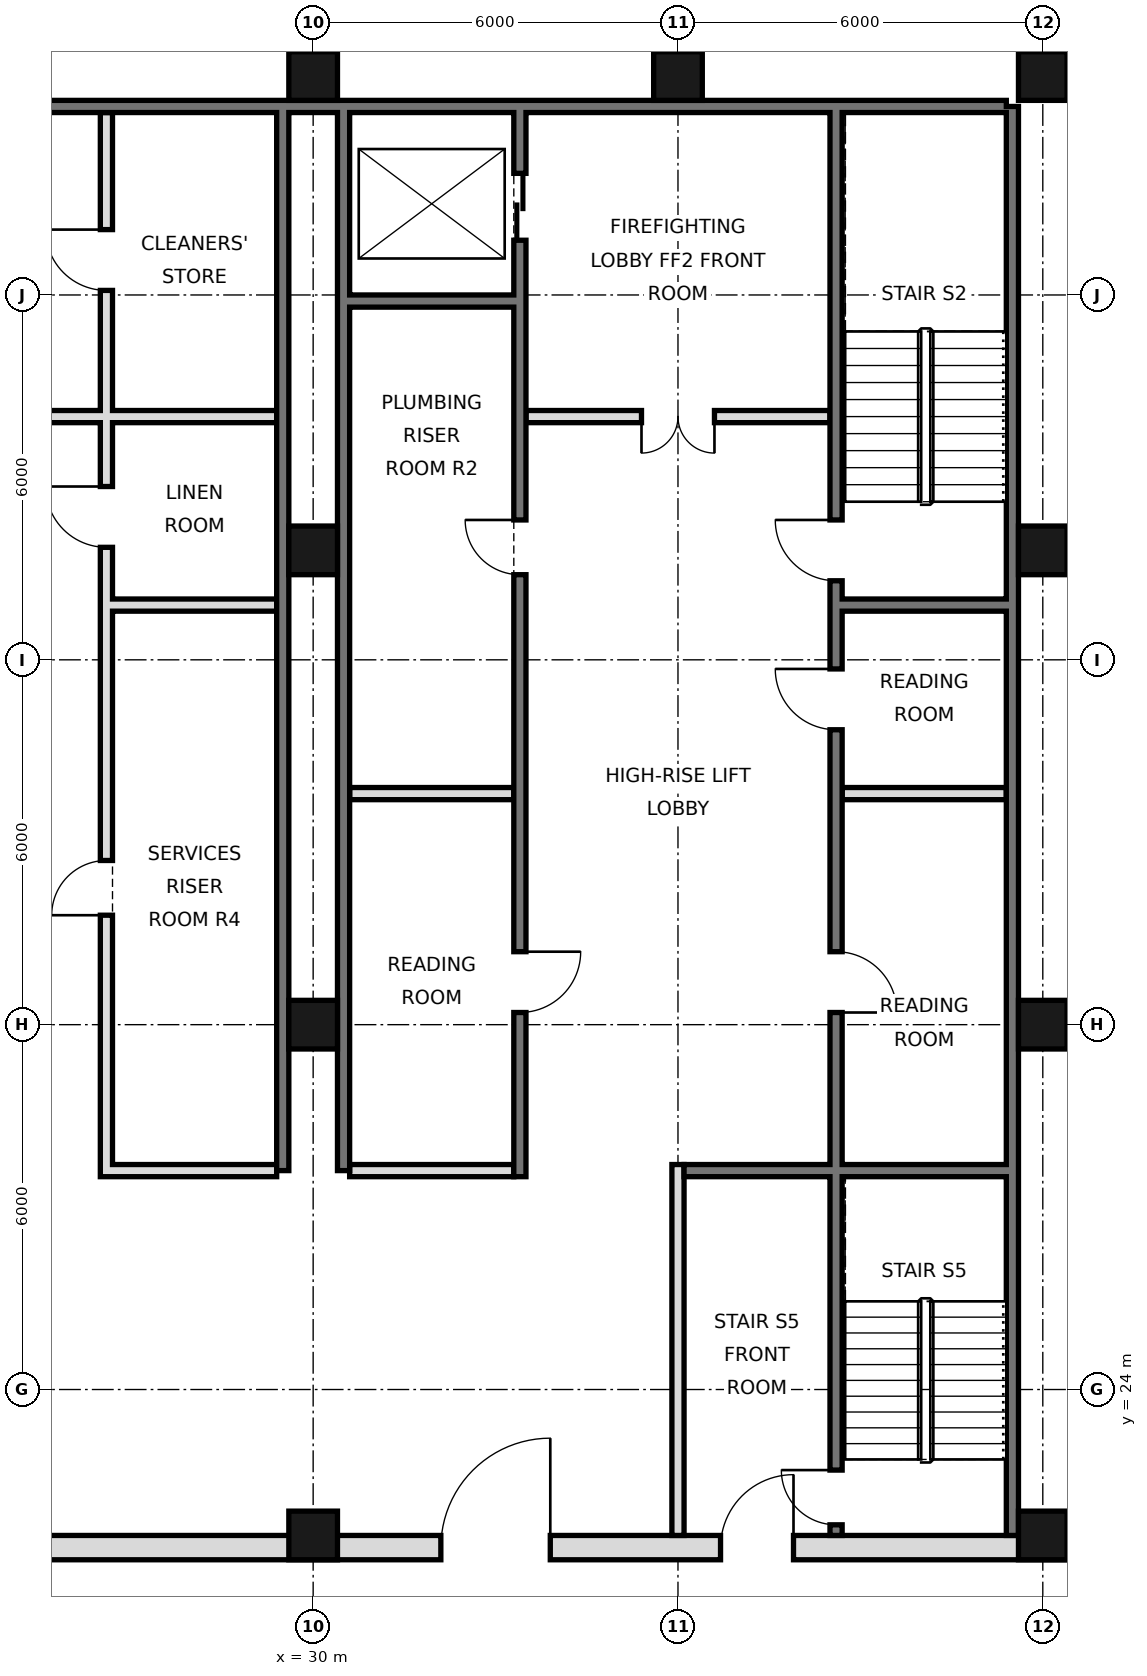
"""IFC4 building model, lengths in metres.
Left out: names, types, materials, properties, quantities, classifications, styles, units other than length and angle.
Written with IfcOpenShell. Run it as: python <this file> out.ifc"""

import sys

from ifc_helpers import new_model, si_unit, direction, frame, frame_2d, origin, origin_2d, place, context, subcontext, project, spatial, rectangle, hollow_rectangle, extrude, element, fill, save


model = new_model("IFC4")
c1 = context("Model", 3, precision=1e-05, world=origin(), true_north=direction((0.0, 1.0)))
c2 = subcontext(c1, "Body", "Model", "MODEL_VIEW")
j1 = project(units=[si_unit("LENGTHUNIT", "METRE"), si_unit("PLANEANGLEUNIT", "RADIAN")], contexts=[c1])
p1 = place(None, origin())
s1 = spatial("IfcSite", under=j1, at=p1, CompositionType="ELEMENT")
p2 = place(p1, origin())
s2 = spatial("IfcBuilding", under=s1, at=p2, CompositionType="ELEMENT")
p3 = place(p2, frame((0.0, 0.0, 147.4)))
s3 = spatial("IfcBuildingStorey", under=s2, at=p3, CompositionType="ELEMENT", Elevation=147.4)
for number, where, z_axis, x_axis in (
    (1, (30.0, 21.6, 0.0), (0.0, 0.0, 1.0), (1.0, 0.0, 0.0)),
    (2, (30.0, 30.0, 0.0), (0.0, 0.0, 1.0), (1.0, 0.0, 0.0)),
    (3, (30.0, 37.8, 0.0), (0.0, 0.0, 1.0), (1.0, 0.0, 0.0)),
    (4, (30.0, 45.6, 0.0), (0.0, 0.0, 1.0), (1.0, 0.0, 0.0)),
    (5, (36.0, 45.6, 0.0), (0.0, 0.0, 1.0), (1.0, 0.0, 0.0)),
    (6, (42.0, 21.6, 0.0), (0.0, 0.0, 1.0), (1.0, 0.0, 0.0)),
    (7, (42.0, 30.0, 0.0), (0.0, 0.0, 1.0), (1.0, 0.0, 0.0)),
    (8, (42.0, 37.8, 0.0), (0.0, 0.0, 1.0), (1.0, 0.0, 0.0)),
    (9, (42.0, 45.6, 0.0), (0.0, 0.0, 1.0), (1.0, 0.0, 0.0)),
):
    element("IfcColumn", number, at=place(p3, frame(where, z_axis=z_axis, x_axis=x_axis)), inside=s3, PredefinedType="COLUMN", context=c2, shape_type="SweptSolid", body=[
        extrude(hollow_rectangle(XDim=0.8, YDim=0.8, WallThickness=0.045, at=origin_2d()), origin(), (0.0, 0.0, 1.0), 3.6),
    ])
p4 = place(p3, frame((41.5, 21.6, 0.0), z_axis=(0.0, 0.0, 1.0), x_axis=(0.0, 1.0, 0.0)))
e10 = element("IfcWall", 10, at=p4, inside=s3, PredefinedType="SOLIDWALL", context=c2, shape_type="SweptSolid", body=[
    extrude(rectangle(XDim=23.5, YDim=0.2, at=frame_2d((11.75, 0.0))), origin(), (0.0, 0.0, 1.0), 3.42),
])
p5 = place(p3, frame((6.6, 45.1, 0.0), z_axis=(0.0, 0.0, 1.0), x_axis=(1.0, 0.0, 0.0)))
e11 = element("IfcWall", 11, at=p5, inside=s3, PredefinedType="SOLIDWALL", context=c2, shape_type="SweptSolid", body=[
    extrude(rectangle(XDim=34.8, YDim=0.2, at=frame_2d((17.4, 0.0))), origin(), (0.0, 0.0, 1.0), 3.42),
])
for number, where, z_axis, x_axis in (
    (12, (29.5, 27.6, 0.0), (0.0, 0.0, 1.0), (0.0, 1.0, 0.0)),
    (13, (30.5, 27.6, 0.0), (0.0, 0.0, 1.0), (0.0, 1.0, 0.0)),
):
    element("IfcWall", number, at=place(p3, frame(where, z_axis=z_axis, x_axis=x_axis)), inside=s3, PredefinedType="SOLIDWALL", context=c2, shape_type="SweptSolid", body=[
        extrude(rectangle(XDim=17.5, YDim=0.2, at=frame_2d((8.75, 0.0))), origin(), (0.0, 0.0, 1.0), 3.42),
    ])
p6 = place(p3, frame((5.6, 21.4, 0.0), z_axis=(0.0, 0.0, 1.0), x_axis=(1.0, 0.0, 0.0)))
e14 = element("IfcWall", 14, at=p6, inside=s3, PredefinedType="SOLIDWALL", context=c2, shape_type="SweptSolid", body=[
    extrude(rectangle(XDim=36.8, YDim=0.4, at=frame_2d((18.4, 0.0))), origin(), (0.0, 0.0, 1.0), 3.42),
])
p7 = place(p6, frame((8.5, 0.0, 0.0)))
e15 = element("IfcOpeningElement", 15, at=p7, cuts=e14, PredefinedType="OPENING", context=c2, shape_type="SweptSolid", body=[
    extrude(rectangle(XDim=1.8, YDim=2.1, at=frame_2d((0.9, 1.05))), frame((0.0, 0.21, 0.0), z_axis=(0.0, -1.0, 0.0), x_axis=(1.0, 0.0, 0.0)), (0.0, 0.0, 1.0), 0.42),
])
p8 = place(p6, frame((17.5, 0.0, 0.0)))
e16 = element("IfcOpeningElement", 16, at=p8, cuts=e14, PredefinedType="OPENING", context=c2, shape_type="SweptSolid", body=[
    extrude(rectangle(XDim=1.8, YDim=2.1, at=frame_2d((0.9, 1.05))), frame((0.0, 0.21, 0.0), z_axis=(0.0, -1.0, 0.0), x_axis=(1.0, 0.0, 0.0)), (0.0, 0.0, 1.0), 0.42),
])
p9 = place(p6, frame((26.5, 0.0, 0.0)))
e17 = element("IfcOpeningElement", 17, at=p9, cuts=e14, PredefinedType="OPENING", context=c2, shape_type="SweptSolid", body=[
    extrude(rectangle(XDim=1.8, YDim=2.1, at=frame_2d((0.9, 1.05))), frame((0.0, 0.21, 0.0), z_axis=(0.0, -1.0, 0.0), x_axis=(1.0, 0.0, 0.0)), (0.0, 0.0, 1.0), 0.42),
])
p10 = place(p6, frame((4.5, 0.0, 0.0)))
e18 = element("IfcOpeningElement", 18, at=p10, cuts=e14, PredefinedType="OPENING", context=c2, shape_type="SweptSolid", body=[
    extrude(rectangle(XDim=1.2, YDim=2.1, at=frame_2d((0.6, 1.05))), frame((0.0, 0.21, 0.0), z_axis=(0.0, -1.0, 0.0), x_axis=(1.0, 0.0, 0.0)), (0.0, 0.0, 1.0), 0.42),
])
p11 = place(p6, frame((31.1, 0.0, 0.0)))
e19 = element("IfcOpeningElement", 19, at=p11, cuts=e14, PredefinedType="OPENING", context=c2, shape_type="SweptSolid", body=[
    extrude(rectangle(XDim=1.2, YDim=2.1, at=frame_2d((0.6, 1.05))), frame((0.0, 0.21, 0.0), z_axis=(0.0, -1.0, 0.0), x_axis=(1.0, 0.0, 0.0)), (0.0, 0.0, 1.0), 0.42),
])
p12 = place(p3, frame((26.6, 27.5, 0.0), z_axis=(0.0, 0.0, 1.0), x_axis=(0.0, 1.0, 0.0)))
e20 = element("IfcWall", 20, at=p12, inside=s3, PredefinedType="SOLIDWALL", context=c2, shape_type="SweptSolid", body=[
    extrude(rectangle(XDim=17.5, YDim=0.2, at=frame_2d((8.75, 0.0))), origin(), (0.0, 0.0, 1.0), 3.42),
])
p13 = place(p12, frame((4.3, 0.0, 0.0)))
e21 = element("IfcOpeningElement", 21, at=p13, cuts=e20, PredefinedType="OPENING", context=c2, shape_type="SweptSolid", body=[
    extrude(rectangle(XDim=0.9, YDim=2.1, at=frame_2d((0.45, 1.05))), frame((0.0, 0.11, 0.0), z_axis=(0.0, -1.0, 0.0), x_axis=(1.0, 0.0, 0.0)), (0.0, 0.0, 1.0), 0.22),
])
p14 = place(p12, frame((10.35, 0.0, 0.0)))
e22 = element("IfcOpeningElement", 22, at=p14, cuts=e20, PredefinedType="OPENING", context=c2, shape_type="SweptSolid", body=[
    extrude(rectangle(XDim=1.0, YDim=2.1, at=frame_2d((0.5, 1.05))), frame((0.0, 0.11, 0.0), z_axis=(0.0, -1.0, 0.0), x_axis=(1.0, 0.0, 0.0)), (0.0, 0.0, 1.0), 0.22),
])
p15 = place(p12, frame((14.575, 0.0, 0.0)))
e23 = element("IfcOpeningElement", 23, at=p15, cuts=e20, PredefinedType="OPENING", context=c2, shape_type="SweptSolid", body=[
    extrude(rectangle(XDim=1.0, YDim=2.1, at=frame_2d((0.5, 1.05))), frame((0.0, 0.11, 0.0), z_axis=(0.0, -1.0, 0.0), x_axis=(1.0, 0.0, 0.0)), (0.0, 0.0, 1.0), 0.22),
])
p16 = place(p3, frame((33.4, 27.5, 0.0), z_axis=(0.0, 0.0, 1.0), x_axis=(0.0, 1.0, 0.0)))
e24 = element("IfcWall", 24, at=p16, inside=s3, PredefinedType="SOLIDWALL", context=c2, shape_type="SweptSolid", body=[
    extrude(rectangle(XDim=17.5, YDim=0.2, at=frame_2d((8.75, 0.0))), origin(), (0.0, 0.0, 1.0), 3.42),
])
p17 = place(p16, frame((15.4, 0.0, 0.0)))
e25 = element("IfcOpeningElement", 25, at=p17, cuts=e24, PredefinedType="OPENING", context=c2, shape_type="SweptSolid", body=[
    extrude(rectangle(XDim=1.1, YDim=2.1, at=frame_2d((0.55, 1.05))), frame((0.0, 0.11, 0.0), z_axis=(0.0, -1.0, 0.0), x_axis=(1.0, 0.0, 0.0)), (0.0, 0.0, 1.0), 0.22),
])
p18 = place(p16, frame((2.7, 0.0, 0.0)))
e26 = element("IfcOpeningElement", 26, at=p18, cuts=e24, PredefinedType="OPENING", context=c2, shape_type="SweptSolid", body=[
    extrude(rectangle(XDim=1.0, YDim=2.1, at=frame_2d((0.5, 1.05))), frame((0.0, 0.11, 0.0), z_axis=(0.0, -1.0, 0.0), x_axis=(1.0, 0.0, 0.0)), (0.0, 0.0, 1.0), 0.22),
])
p19 = place(p16, frame((9.9, 0.0, 0.0)))
e27 = element("IfcOpeningElement", 27, at=p19, cuts=e24, PredefinedType="OPENING", context=c2, shape_type="SweptSolid", body=[
    extrude(rectangle(XDim=0.9, YDim=2.1, at=frame_2d((0.45, 1.05))), frame((0.0, 0.11, 0.0), z_axis=(0.0, -1.0, 0.0), x_axis=(1.0, 0.0, 0.0)), (0.0, 0.0, 1.0), 0.22),
])
p20 = place(p3, frame((36.0, 21.6, 0.0), z_axis=(0.0, 0.0, 1.0), x_axis=(0.0, 1.0, 0.0)))
e28 = element("IfcWall", 28, at=p20, inside=s3, PredefinedType="PARTITIONING", context=c2, shape_type="SweptSolid", body=[
    extrude(rectangle(XDim=6.1, YDim=0.2, at=frame_2d((3.05, 0.0))), origin(), (0.0, 0.0, 1.0), 3.42),
])
p21 = place(p3, frame((38.6, 21.6, 0.0), z_axis=(0.0, 0.0, 1.0), x_axis=(0.0, 1.0, 0.0)))
e29 = element("IfcWall", 29, at=p21, inside=s3, PredefinedType="SOLIDWALL", context=c2, shape_type="SweptSolid", body=[
    extrude(rectangle(XDim=23.4, YDim=0.2, at=frame_2d((11.7, 0.0))), origin(), (0.0, 0.0, 1.0), 3.42),
])
p22 = place(p21, frame((8.6, 0.0, 0.0)))
e30 = element("IfcOpeningElement", 30, at=p22, cuts=e29, PredefinedType="OPENING", context=c2, shape_type="SweptSolid", body=[
    extrude(rectangle(XDim=1.0, YDim=2.1, at=frame_2d((0.5, 1.05))), frame((0.0, 0.11, 0.0), z_axis=(0.0, -1.0, 0.0), x_axis=(1.0, 0.0, 0.0)), (0.0, 0.0, 1.0), 0.22),
])
p23 = place(p21, frame((13.25, 0.0, 0.0)))
e31 = element("IfcOpeningElement", 31, at=p23, cuts=e29, PredefinedType="OPENING", context=c2, shape_type="SweptSolid", body=[
    extrude(rectangle(XDim=1.0, YDim=2.1, at=frame_2d((0.5, 1.05))), frame((0.0, 0.11, 0.0), z_axis=(0.0, -1.0, 0.0), x_axis=(1.0, 0.0, 0.0)), (0.0, 0.0, 1.0), 0.22),
])
p24 = place(p21, frame((15.7, 0.0, 0.0)))
e32 = element("IfcOpeningElement", 32, at=p24, cuts=e29, PredefinedType="OPENING", context=c2, shape_type="SweptSolid", body=[
    extrude(rectangle(XDim=1.0, YDim=2.1, at=frame_2d((0.5, 1.05))), frame((0.0, 0.11, 0.0), z_axis=(0.0, -1.0, 0.0), x_axis=(1.0, 0.0, 0.0)), (0.0, 0.0, 1.0), 0.22),
])
p25 = place(p21, frame((0.175, 0.0, 0.0)))
e33 = element("IfcOpeningElement", 33, at=p25, cuts=e29, PredefinedType="OPENING", context=c2, shape_type="SweptSolid", body=[
    extrude(rectangle(XDim=0.9, YDim=2.1, at=frame_2d((0.45, 1.05))), frame((0.0, 0.11, 0.0), z_axis=(0.0, -1.0, 0.0), x_axis=(1.0, 0.0, 0.0)), (0.0, 0.0, 1.0), 0.22),
])
p26 = place(p3, frame((26.7, 27.6, 0.0), z_axis=(0.0, 0.0, 1.0), x_axis=(1.0, 0.0, 0.0)))
e34 = element("IfcWall", 34, at=p26, inside=s3, PredefinedType="SOLIDWALL", context=c2, shape_type="SweptSolid", body=[
    extrude(rectangle(XDim=2.7, YDim=0.2, at=frame_2d((1.35, 0.0))), origin(), (0.0, 0.0, 1.0), 3.42),
])
p27 = place(p3, frame((30.6, 27.6, 0.0), z_axis=(0.0, 0.0, 1.0), x_axis=(1.0, 0.0, 0.0)))
e35 = element("IfcWall", 35, at=p27, inside=s3, PredefinedType="PARTITIONING", context=c2, shape_type="SweptSolid", body=[
    extrude(rectangle(XDim=2.7, YDim=0.2, at=frame_2d((1.35, 0.0))), origin(), (0.0, 0.0, 1.0), 3.42),
])
p28 = place(p3, frame((36.1, 27.6, 0.0), z_axis=(0.0, 0.0, 1.0), x_axis=(1.0, 0.0, 0.0)))
e36 = element("IfcWall", 36, at=p28, inside=s3, PredefinedType="SOLIDWALL", context=c2, shape_type="SweptSolid", body=[
    extrude(rectangle(XDim=5.3, YDim=0.2, at=frame_2d((2.65, 0.0))), origin(), (0.0, 0.0, 1.0), 3.42),
])
p29 = place(p3, frame((30.6, 33.8, 0.0), z_axis=(0.0, 0.0, 1.0), x_axis=(1.0, 0.0, 0.0)))
e37 = element("IfcWall", 37, at=p29, inside=s3, PredefinedType="SOLIDWALL", context=c2, shape_type="SweptSolid", body=[
    extrude(rectangle(XDim=2.7, YDim=0.2, at=frame_2d((1.35, 0.0))), origin(), (0.0, 0.0, 1.0), 3.42),
])
p30 = place(p3, frame((38.7, 33.8, 0.0), z_axis=(0.0, 0.0, 1.0), x_axis=(1.0, 0.0, 0.0)))
e38 = element("IfcWall", 38, at=p30, inside=s3, PredefinedType="PARTITIONING", context=c2, shape_type="SweptSolid", body=[
    extrude(rectangle(XDim=2.7, YDim=0.2, at=frame_2d((1.35, 0.0))), origin(), (0.0, 0.0, 1.0), 3.42),
])
for number, where, z_axis, x_axis in (
    (39, (26.7, 36.9, 0.0), (0.0, 0.0, 1.0), (1.0, 0.0, 0.0)),
    (40, (38.7, 36.9, 0.0), (0.0, 0.0, 1.0), (1.0, 0.0, 0.0)),
):
    element("IfcWall", number, at=place(p3, frame(where, z_axis=z_axis, x_axis=x_axis)), inside=s3, PredefinedType="SOLIDWALL", context=c2, shape_type="SweptSolid", body=[
        extrude(rectangle(XDim=2.7, YDim=0.2, at=frame_2d((1.35, 0.0))), origin(), (0.0, 0.0, 1.0), 3.42),
    ])
p31 = place(p3, frame((21.5, 40.0, 0.0), z_axis=(0.0, 0.0, 1.0), x_axis=(1.0, 0.0, 0.0)))
e41 = element("IfcWall", 41, at=p31, inside=s3, PredefinedType="PARTITIONING", context=c2, shape_type="SweptSolid", body=[
    extrude(rectangle(XDim=7.9, YDim=0.2, at=frame_2d((3.95, 0.0))), origin(), (0.0, 0.0, 1.0), 3.42),
])
p32 = place(p31, frame((1.9, 0.0, 0.0)))
e42 = element("IfcOpeningElement", 42, at=p32, cuts=e41, PredefinedType="OPENING", context=c2, shape_type="SweptSolid", body=[
    extrude(rectangle(XDim=1.2, YDim=2.1, at=frame_2d((0.6, 1.05))), frame((0.0, 0.11, 0.0), z_axis=(0.0, -1.0, 0.0), x_axis=(1.0, 0.0, 0.0)), (0.0, 0.0, 1.0), 0.22),
])
p33 = place(p3, frame((33.5, 40.0, 0.0), z_axis=(0.0, 0.0, 1.0), x_axis=(1.0, 0.0, 0.0)))
e43 = element("IfcWall", 43, at=p33, inside=s3, PredefinedType="PARTITIONING", context=c2, shape_type="SweptSolid", body=[
    extrude(rectangle(XDim=5.0, YDim=0.2, at=frame_2d((2.5, 0.0))), origin(), (0.0, 0.0, 1.0), 3.42),
])
p34 = place(p33, frame((1.9, 0.0, 0.0)))
e44 = element("IfcOpeningElement", 44, at=p34, cuts=e43, PredefinedType="OPENING", context=c2, shape_type="SweptSolid", body=[
    extrude(rectangle(XDim=1.2, YDim=2.1, at=frame_2d((0.6, 1.05))), frame((0.0, 0.11, 0.0), z_axis=(0.0, -1.0, 0.0), x_axis=(1.0, 0.0, 0.0)), (0.0, 0.0, 1.0), 0.22),
])
p35 = place(p3, frame((30.6, 41.9, 0.0), z_axis=(0.0, 0.0, 1.0), x_axis=(1.0, 0.0, 0.0)))
e45 = element("IfcWall", 45, at=p35, inside=s3, PredefinedType="SOLIDWALL", context=c2, shape_type="SweptSolid", body=[
    extrude(rectangle(XDim=2.7, YDim=0.2, at=frame_2d((1.35, 0.0))), origin(), (0.0, 0.0, 1.0), 3.42),
])
p36 = place(p9, frame((1.8, 0.0, 0.0), z_axis=(0.0, 0.0, 1.0), x_axis=(-1.0, 0.0, 0.0)))
e46 = element("IfcDoor", 46, at=p36, inside=s3, OperationType="SINGLE_SWING_LEFT", PredefinedType="DOOR", context=c2, shape_type="SweptSolid", body=[
    extrude(rectangle(XDim=1.8, YDim=2.1, at=frame_2d((0.9, 1.05))), frame((0.0, 0.025, 0.0), z_axis=(0.0, -1.0, 0.0), x_axis=(1.0, 0.0, 0.0)), (0.0, 0.0, 1.0), 0.05),
])
fill(e17, e46)
p37 = place(p11, frame((1.2, 0.0, 0.0), z_axis=(0.0, 0.0, 1.0), x_axis=(-1.0, 0.0, 0.0)))
e47 = element("IfcDoor", 47, at=p37, inside=s3, OperationType="SINGLE_SWING_LEFT", PredefinedType="DOOR", context=c2, shape_type="SweptSolid", body=[
    extrude(rectangle(XDim=1.2, YDim=2.1, at=frame_2d((0.6, 1.05))), frame((0.0, 0.025, 0.0), z_axis=(0.0, -1.0, 0.0), x_axis=(1.0, 0.0, 0.0)), (0.0, 0.0, 1.0), 0.05),
])
fill(e19, e47)
p38 = place(p34, frame((1.2, 0.0, 0.0), z_axis=(0.0, 0.0, 1.0), x_axis=(-1.0, 0.0, 0.0)))
e48 = element("IfcDoor", 48, at=p38, inside=s3, OperationType="DOUBLE_DOOR_SINGLE_SWING", PredefinedType="DOOR", context=c2, shape_type="SweptSolid", body=[
    extrude(rectangle(XDim=1.2, YDim=2.1, at=frame_2d((0.6, 1.05))), frame((0.0, 0.025, 0.0), z_axis=(0.0, -1.0, 0.0), x_axis=(1.0, 0.0, 0.0)), (0.0, 0.0, 1.0), 0.05),
])
fill(e44, e48)
p39 = place(p17, origin())
e49 = element("IfcDoor", 49, at=p39, inside=s3, OperationType="DOUBLE_DOOR_SLIDING", PredefinedType="DOOR", context=c2, shape_type="SweptSolid", body=[
    extrude(rectangle(XDim=1.1, YDim=2.1, at=frame_2d((0.55, 1.05))), frame((0.0, 0.025, 0.0), z_axis=(0.0, -1.0, 0.0), x_axis=(1.0, 0.0, 0.0)), (0.0, 0.0, 1.0), 0.05),
])
fill(e25, e49)
p40 = place(p22, frame((1.0, 0.0, 0.0), z_axis=(0.0, 0.0, 1.0), x_axis=(-1.0, 0.0, 0.0)))
e50 = element("IfcDoor", 50, at=p40, inside=s3, OperationType="SINGLE_SWING_RIGHT", PredefinedType="DOOR", context=c2, shape_type="SweptSolid", body=[
    extrude(rectangle(XDim=1.0, YDim=2.1, at=frame_2d((0.5, 1.05))), frame((0.0, 0.025, 0.0), z_axis=(0.0, -1.0, 0.0), x_axis=(1.0, 0.0, 0.0)), (0.0, 0.0, 1.0), 0.05),
])
fill(e30, e50)
p41 = place(p23, frame((1.0, 0.0, 0.0), z_axis=(0.0, 0.0, 1.0), x_axis=(-1.0, 0.0, 0.0)))
e51 = element("IfcDoor", 51, at=p41, inside=s3, OperationType="SINGLE_SWING_LEFT", PredefinedType="DOOR", context=c2, shape_type="SweptSolid", body=[
    extrude(rectangle(XDim=1.0, YDim=2.1, at=frame_2d((0.5, 1.05))), frame((0.0, 0.025, 0.0), z_axis=(0.0, -1.0, 0.0), x_axis=(1.0, 0.0, 0.0)), (0.0, 0.0, 1.0), 0.05),
])
fill(e31, e51)
p42 = place(p18, origin())
e52 = element("IfcDoor", 52, at=p42, inside=s3, OperationType="SINGLE_SWING_RIGHT", PredefinedType="DOOR", context=c2, shape_type="SweptSolid", body=[
    extrude(rectangle(XDim=1.0, YDim=2.1, at=frame_2d((0.5, 1.05))), frame((0.0, 0.025, 0.0), z_axis=(0.0, -1.0, 0.0), x_axis=(1.0, 0.0, 0.0)), (0.0, 0.0, 1.0), 0.05),
])
fill(e26, e52)
p43 = place(p24, frame((1.0, 0.0, 0.0), z_axis=(0.0, 0.0, 1.0), x_axis=(-1.0, 0.0, 0.0)))
e53 = element("IfcDoor", 53, at=p43, inside=s3, OperationType="SINGLE_SWING_LEFT", PredefinedType="DOOR", context=c2, shape_type="SweptSolid", body=[
    extrude(rectangle(XDim=1.0, YDim=2.1, at=frame_2d((0.5, 1.05))), frame((0.0, 0.025, 0.0), z_axis=(0.0, -1.0, 0.0), x_axis=(1.0, 0.0, 0.0)), (0.0, 0.0, 1.0), 0.05),
])
fill(e32, e53)
p44 = place(p25, frame((0.9, 0.0, 0.0), z_axis=(0.0, 0.0, 1.0), x_axis=(-1.0, 0.0, 0.0)))
e54 = element("IfcDoor", 54, at=p44, inside=s3, OperationType="SINGLE_SWING_LEFT", PredefinedType="DOOR", context=c2, shape_type="SweptSolid", body=[
    extrude(rectangle(XDim=0.9, YDim=2.1, at=frame_2d((0.45, 1.05))), frame((0.0, 0.025, 0.0), z_axis=(0.0, -1.0, 0.0), x_axis=(1.0, 0.0, 0.0)), (0.0, 0.0, 1.0), 0.05),
])
fill(e33, e54)
p45 = place(p19, frame((0.9, 0.0, 0.0), z_axis=(0.0, 0.0, 1.0), x_axis=(-1.0, 0.0, 0.0)))
e55 = element("IfcDoor", 55, at=p45, inside=s3, OperationType="SINGLE_SWING_LEFT", PredefinedType="DOOR", context=c2, shape_type="SweptSolid", body=[
    extrude(rectangle(XDim=0.9, YDim=2.1, at=frame_2d((0.45, 1.05))), frame((0.0, 0.025, 0.0), z_axis=(0.0, -1.0, 0.0), x_axis=(1.0, 0.0, 0.0)), (0.0, 0.0, 1.0), 0.05),
])
fill(e27, e55)
p46 = place(p13, origin())
e56 = element("IfcDoor", 56, at=p46, inside=s3, OperationType="SINGLE_SWING_LEFT", PredefinedType="DOOR", context=c2, shape_type="SweptSolid", body=[
    extrude(rectangle(XDim=0.9, YDim=2.1, at=frame_2d((0.45, 1.05))), frame((0.0, 0.025, 0.0), z_axis=(0.0, -1.0, 0.0), x_axis=(1.0, 0.0, 0.0)), (0.0, 0.0, 1.0), 0.05),
])
fill(e21, e56)
p47 = place(p14, frame((1.0, 0.0, 0.0), z_axis=(0.0, 0.0, 1.0), x_axis=(-1.0, 0.0, 0.0)))
e57 = element("IfcDoor", 57, at=p47, inside=s3, OperationType="SINGLE_SWING_LEFT", PredefinedType="DOOR", context=c2, shape_type="SweptSolid", body=[
    extrude(rectangle(XDim=1.0, YDim=2.1, at=frame_2d((0.5, 1.05))), frame((0.0, 0.025, 0.0), z_axis=(0.0, -1.0, 0.0), x_axis=(1.0, 0.0, 0.0)), (0.0, 0.0, 1.0), 0.05),
])
fill(e22, e57)
p48 = place(p15, frame((1.0, 0.0, 0.0), z_axis=(0.0, 0.0, 1.0), x_axis=(-1.0, 0.0, 0.0)))
e58 = element("IfcDoor", 58, at=p48, inside=s3, OperationType="SINGLE_SWING_LEFT", PredefinedType="DOOR", context=c2, shape_type="SweptSolid", body=[
    extrude(rectangle(XDim=1.0, YDim=2.1, at=frame_2d((0.5, 1.05))), frame((0.0, 0.025, 0.0), z_axis=(0.0, -1.0, 0.0), x_axis=(1.0, 0.0, 0.0)), (0.0, 0.0, 1.0), 0.05),
])
fill(e23, e58)
save(model, sys.argv[1])
